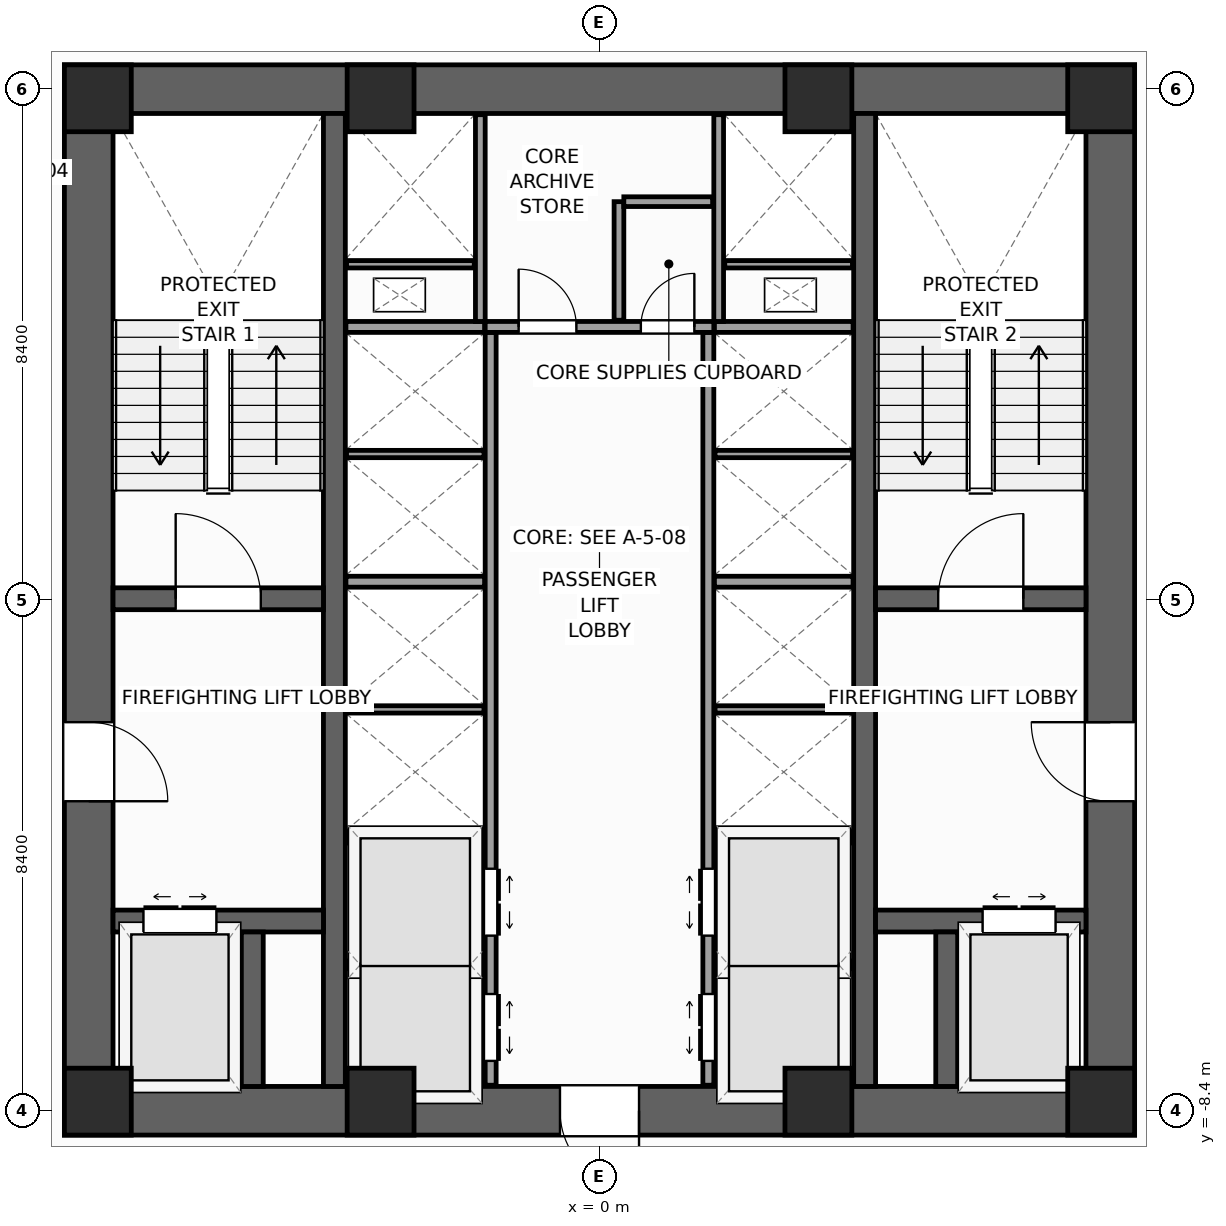
"""IFC4 building model, lengths in metres.
Left out: names, types, materials, properties, quantities, classifications, styles, units other than length and angle.
Written with IfcOpenShell. Run it as: python <this file> out.ifc"""

import sys

from ifc_helpers import new_model, si_unit, direction, frame, frame_2d, origin, origin_2d, place, context, subcontext, project, spatial, rectangle, extrude, source, transform, mapped, element, fill, save


model = new_model("IFC4")
c1 = context("Model", 3, precision=1e-05, world=origin(), true_north=direction((0.0, 1.0)))
c2 = subcontext(c1, "Body", "Model", "MODEL_VIEW")
j1 = project(units=[si_unit("LENGTHUNIT", "METRE"), si_unit("PLANEANGLEUNIT", "RADIAN")], contexts=[c1])
p1 = place(None, origin())
s1 = spatial("IfcSite", under=j1, at=p1, CompositionType="ELEMENT")
p2 = place(p1, origin())
s2 = spatial("IfcBuilding", under=s1, at=p2, CompositionType="ELEMENT")
p3 = place(p2, frame((0.0, 0.0, 42.0)))
s3 = spatial("IfcBuildingStorey", under=s2, at=p3, CompositionType="ELEMENT", Elevation=42.0)
p4 = place(p3, frame((-8.8, -8.4, 0.0), z_axis=(0.0, 0.0, 1.0), x_axis=(1.0, 0.0, 0.0)))
e1 = element("IfcWall", 1, at=p4, inside=s3, PredefinedType="SHEAR", context=c2, shape_type="SweptSolid", body=[
    extrude(rectangle(XDim=17.6, YDim=0.8, at=frame_2d((8.8, 0.0))), origin(), (0.0, 0.0, 1.0), 4.0),
])
p5 = place(p4, frame((8.15, 0.0, 0.0)))
e2 = element("IfcOpeningElement", 2, at=p5, cuts=e1, PredefinedType="OPENING", context=c2, shape_type="SweptSolid", body=[
    extrude(rectangle(XDim=1.3, YDim=2.2, at=frame_2d((0.65, 1.1))), frame((0.0, 0.41, 0.0), z_axis=(0.0, -1.0, 0.0), x_axis=(1.0, 0.0, 0.0)), (0.0, 0.0, 1.0), 0.82),
])
p6 = place(p3, frame((-8.8, 8.4, 0.0), z_axis=(0.0, 0.0, 1.0), x_axis=(1.0, 0.0, 0.0)))
e3 = element("IfcWall", 3, at=p6, inside=s3, PredefinedType="SHEAR", context=c2, shape_type="SweptSolid", body=[
    extrude(rectangle(XDim=17.6, YDim=0.8, at=frame_2d((8.8, 0.0))), origin(), (0.0, 0.0, 1.0), 4.0),
])
p7 = place(p3, frame((-8.4, -8.0, 0.0), z_axis=(0.0, 0.0, 1.0), x_axis=(0.0, 1.0, 0.0)))
e4 = element("IfcWall", 4, at=p7, inside=s3, PredefinedType="SHEAR", context=c2, shape_type="SweptSolid", body=[
    extrude(rectangle(XDim=16.0, YDim=0.8, at=frame_2d((8.0, 0.0))), origin(), (0.0, 0.0, 1.0), 4.0),
])
p8 = place(p7, frame((4.69, 0.0, 0.0)))
e5 = element("IfcOpeningElement", 5, at=p8, cuts=e4, PredefinedType="OPENING", context=c2, shape_type="SweptSolid", body=[
    extrude(rectangle(XDim=1.3, YDim=2.2, at=frame_2d((0.65, 1.1))), frame((0.0, 0.41, 0.0), z_axis=(0.0, -1.0, 0.0), x_axis=(1.0, 0.0, 0.0)), (0.0, 0.0, 1.0), 0.82),
])
p9 = place(p3, frame((8.4, -8.0, 0.0), z_axis=(0.0, 0.0, 1.0), x_axis=(0.0, 1.0, 0.0)))
e6 = element("IfcWall", 6, at=p9, inside=s3, PredefinedType="SHEAR", context=c2, shape_type="SweptSolid", body=[
    extrude(rectangle(XDim=16.0, YDim=0.8, at=frame_2d((8.0, 0.0))), origin(), (0.0, 0.0, 1.0), 4.0),
])
p10 = place(p9, frame((4.69, 0.0, 0.0)))
e7 = element("IfcOpeningElement", 7, at=p10, cuts=e6, PredefinedType="OPENING", context=c2, shape_type="SweptSolid", body=[
    extrude(rectangle(XDim=1.3, YDim=2.2, at=frame_2d((0.65, 1.1))), frame((0.0, 0.41, 0.0), z_axis=(0.0, -1.0, 0.0), x_axis=(1.0, 0.0, 0.0)), (0.0, 0.0, 1.0), 0.82),
])
for number, where, z_axis, x_axis in (
    (8, (-4.36, -8.0, 0.0), (0.0, 0.0, 1.0), (0.0, 1.0, 0.0)),
    (9, (4.36, -8.0, 0.0), (0.0, 0.0, 1.0), (0.0, 1.0, 0.0)),
):
    element("IfcWall", number, at=place(p3, frame(where, z_axis=z_axis, x_axis=x_axis)), inside=s3, PredefinedType="SHEAR", context=c2, shape_type="SweptSolid", body=[
        extrude(rectangle(XDim=16.0, YDim=0.36, at=frame_2d((8.0, 0.0))), origin(), (0.0, 0.0, 1.0), 4.0),
    ])
p11 = place(p3, frame((-8.0, 0.02, 0.0), z_axis=(0.0, 0.0, 1.0), x_axis=(1.0, 0.0, 0.0)))
e10 = element("IfcWall", 10, at=p11, inside=s3, PredefinedType="SHEAR", context=c2, shape_type="SweptSolid", body=[
    extrude(rectangle(XDim=3.46, YDim=0.36, at=frame_2d((1.73, 0.0))), origin(), (0.0, 0.0, 1.0), 4.0),
])
p12 = place(p11, frame((1.03, 0.0, 0.0)))
e11 = element("IfcOpeningElement", 11, at=p12, cuts=e10, PredefinedType="OPENING", context=c2, shape_type="SweptSolid", body=[
    extrude(rectangle(XDim=1.4, YDim=2.2, at=frame_2d((0.7, 1.1))), frame((0.0, 0.19, 0.0), z_axis=(0.0, -1.0, 0.0), x_axis=(1.0, 0.0, 0.0)), (0.0, 0.0, 1.0), 0.38),
])
p13 = place(p3, frame((4.54, 0.02, 0.0), z_axis=(0.0, 0.0, 1.0), x_axis=(1.0, 0.0, 0.0)))
e12 = element("IfcWall", 12, at=p13, inside=s3, PredefinedType="SHEAR", context=c2, shape_type="SweptSolid", body=[
    extrude(rectangle(XDim=3.46, YDim=0.36, at=frame_2d((1.73, 0.0))), origin(), (0.0, 0.0, 1.0), 4.0),
])
p14 = place(p13, frame((1.03, 0.0, 0.0)))
e13 = element("IfcOpeningElement", 13, at=p14, cuts=e12, PredefinedType="OPENING", context=c2, shape_type="SweptSolid", body=[
    extrude(rectangle(XDim=1.4, YDim=2.2, at=frame_2d((0.7, 1.1))), frame((0.0, 0.19, 0.0), z_axis=(0.0, -1.0, 0.0), x_axis=(1.0, 0.0, 0.0)), (0.0, 0.0, 1.0), 0.38),
])
p15 = place(p3, frame((-8.0, -5.28, 0.0), z_axis=(0.0, 0.0, 1.0), x_axis=(1.0, 0.0, 0.0)))
e14 = element("IfcWall", 14, at=p15, inside=s3, PredefinedType="SHEAR", context=c2, shape_type="SweptSolid", body=[
    extrude(rectangle(XDim=3.46, YDim=0.36, at=frame_2d((1.73, 0.0))), origin(), (0.0, 0.0, 1.0), 4.0),
])
p16 = place(p15, frame((0.5, 0.0, 0.0)))
e15 = element("IfcOpeningElement", 15, at=p16, cuts=e14, PredefinedType="OPENING", context=c2, shape_type="SweptSolid", body=[
    extrude(rectangle(XDim=1.2, YDim=2.25, at=frame_2d((0.6, 1.125))), frame((0.0, 0.19, 0.0), z_axis=(0.0, -1.0, 0.0), x_axis=(1.0, 0.0, 0.0)), (0.0, 0.0, 1.0), 0.38),
])
p17 = place(p3, frame((4.54, -5.28, 0.0), z_axis=(0.0, 0.0, 1.0), x_axis=(1.0, 0.0, 0.0)))
e16 = element("IfcWall", 16, at=p17, inside=s3, PredefinedType="SHEAR", context=c2, shape_type="SweptSolid", body=[
    extrude(rectangle(XDim=3.46, YDim=0.36, at=frame_2d((1.73, 0.0))), origin(), (0.0, 0.0, 1.0), 4.0),
])
p18 = place(p17, frame((1.76, 0.0, 0.0)))
e17 = element("IfcOpeningElement", 17, at=p18, cuts=e16, PredefinedType="OPENING", context=c2, shape_type="SweptSolid", body=[
    extrude(rectangle(XDim=1.2, YDim=2.25, at=frame_2d((0.6, 1.125))), frame((0.0, 0.19, 0.0), z_axis=(0.0, -1.0, 0.0), x_axis=(1.0, 0.0, 0.0)), (0.0, 0.0, 1.0), 0.38),
])
for number, where, z_axis, x_axis in (
    (18, (-5.71, -8.0, 0.0), (0.0, 0.0, 1.0), (0.0, 1.0, 0.0)),
    (19, (5.71, -8.0, 0.0), (0.0, 0.0, 1.0), (0.0, 1.0, 0.0)),
):
    element("IfcWall", number, at=place(p3, frame(where, z_axis=z_axis, x_axis=x_axis)), inside=s3, PredefinedType="SHEAR", context=c2, shape_type="SweptSolid", body=[
        extrude(rectangle(XDim=2.54, YDim=0.36, at=frame_2d((1.27, 0.0))), origin(), (0.0, 0.0, 1.0), 4.0),
    ])
m1 = source(origin(), c2, "Body", "SweptSolid", [
    extrude(rectangle(XDim=1.1, YDim=1.1, at=origin_2d()), origin(), (0.0, 0.0, 1.0), 4.0),
])
for number, where, z_axis, x_axis in (
    (20, (-8.25, -8.25, 0.0), (0.0, 0.0, 1.0), (1.0, 0.0, 0.0)),
    (21, (8.25, -8.25, 0.0), (0.0, 0.0, 1.0), (1.0, 0.0, 0.0)),
    (22, (8.25, 8.25, 0.0), (0.0, 0.0, 1.0), (1.0, 0.0, 0.0)),
    (23, (-8.25, 8.25, 0.0), (0.0, 0.0, 1.0), (1.0, 0.0, 0.0)),
    (24, (-3.6, -8.25, 0.0), (0.0, 0.0, 1.0), (1.0, 0.0, 0.0)),
    (25, (3.6, -8.25, 0.0), (0.0, 0.0, 1.0), (1.0, 0.0, 0.0)),
    (26, (-3.6, 8.25, 0.0), (0.0, 0.0, 1.0), (1.0, 0.0, 0.0)),
    (27, (3.6, 8.25, 0.0), (0.0, 0.0, 1.0), (1.0, 0.0, 0.0)),
):
    element("IfcColumn", number, at=place(p3, frame(where, z_axis=z_axis, x_axis=x_axis)), inside=s3, PredefinedType="PILASTER", context=c2, shape_type="MappedRepresentation", body=[
        mapped(m1, transform((0.0, 0.0, 0.0), scale=1.0)),
    ])
p19 = place(p3, frame((-1.79, -7.98, 0.0), z_axis=(0.0, 0.0, 1.0), x_axis=(0.0, 1.0, 0.0)))
e28 = element("IfcWall", 28, at=p19, inside=s3, PredefinedType="PARTITIONING", context=c2, shape_type="SweptSolid", body=[
    extrude(rectangle(XDim=12.38, YDim=0.18, at=frame_2d((6.19, 0.0))), origin(), (0.0, 0.0, 1.0), 3.72),
])
p20 = place(p19, frame((0.4, 0.0, 0.0)))
e29 = element("IfcOpeningElement", 29, at=p20, cuts=e28, PredefinedType="OPENING", context=c2, shape_type="SweptSolid", body=[
    extrude(rectangle(XDim=1.1, YDim=2.2, at=frame_2d((0.55, 1.1))), frame((0.0, 0.1, 0.0), z_axis=(0.0, -1.0, 0.0), x_axis=(1.0, 0.0, 0.0)), (0.0, 0.0, 1.0), 0.2),
])
p21 = place(p19, frame((2.46, 0.0, 0.0)))
e30 = element("IfcOpeningElement", 30, at=p21, cuts=e28, PredefinedType="OPENING", context=c2, shape_type="SweptSolid", body=[
    extrude(rectangle(XDim=1.1, YDim=2.2, at=frame_2d((0.55, 1.1))), frame((0.0, 0.1, 0.0), z_axis=(0.0, -1.0, 0.0), x_axis=(1.0, 0.0, 0.0)), (0.0, 0.0, 1.0), 0.2),
])
p22 = place(p3, frame((1.79, -7.98, 0.0), z_axis=(0.0, 0.0, 1.0), x_axis=(0.0, 1.0, 0.0)))
e31 = element("IfcWall", 31, at=p22, inside=s3, PredefinedType="PARTITIONING", context=c2, shape_type="SweptSolid", body=[
    extrude(rectangle(XDim=12.38, YDim=0.18, at=frame_2d((6.19, 0.0))), origin(), (0.0, 0.0, 1.0), 3.72),
])
p23 = place(p22, frame((0.4, 0.0, 0.0)))
e32 = element("IfcOpeningElement", 32, at=p23, cuts=e31, PredefinedType="OPENING", context=c2, shape_type="SweptSolid", body=[
    extrude(rectangle(XDim=1.1, YDim=2.2, at=frame_2d((0.55, 1.1))), frame((0.0, 0.1, 0.0), z_axis=(0.0, -1.0, 0.0), x_axis=(1.0, 0.0, 0.0)), (0.0, 0.0, 1.0), 0.2),
])
p24 = place(p22, frame((2.46, 0.0, 0.0)))
e33 = element("IfcOpeningElement", 33, at=p24, cuts=e31, PredefinedType="OPENING", context=c2, shape_type="SweptSolid", body=[
    extrude(rectangle(XDim=1.1, YDim=2.2, at=frame_2d((0.55, 1.1))), frame((0.0, 0.1, 0.0), z_axis=(0.0, -1.0, 0.0), x_axis=(1.0, 0.0, 0.0)), (0.0, 0.0, 1.0), 0.2),
])
p25 = place(p3, frame((-1.88, 4.49, 0.0), z_axis=(0.0, 0.0, 1.0), x_axis=(1.0, 0.0, 0.0)))
e34 = element("IfcWall", 34, at=p25, inside=s3, PredefinedType="PARTITIONING", context=c2, shape_type="SweptSolid", body=[
    extrude(rectangle(XDim=3.76, YDim=0.18, at=frame_2d((1.88, 0.0))), origin(), (0.0, 0.0, 1.0), 3.72),
])
p26 = place(p25, frame((0.55, 0.0, 0.0)))
e35 = element("IfcOpeningElement", 35, at=p26, cuts=e34, PredefinedType="OPENING", context=c2, shape_type="SweptSolid", body=[
    extrude(rectangle(XDim=0.95, YDim=2.1, at=frame_2d((0.475, 1.05))), frame((0.0, 0.1, 0.0), z_axis=(0.0, -1.0, 0.0), x_axis=(1.0, 0.0, 0.0)), (0.0, 0.0, 1.0), 0.2),
])
p27 = place(p25, frame((2.56, 0.0, 0.0)))
e36 = element("IfcOpeningElement", 36, at=p27, cuts=e34, PredefinedType="OPENING", context=c2, shape_type="SweptSolid", body=[
    extrude(rectangle(XDim=0.88, YDim=2.1, at=frame_2d((0.44, 1.05))), frame((0.0, 0.1, 0.0), z_axis=(0.0, -1.0, 0.0), x_axis=(1.0, 0.0, 0.0)), (0.0, 0.0, 1.0), 0.2),
])
for number, where, z_axis, x_axis in (
    (37, (-4.17, -3.9, 0.0), (0.0, 0.0, 1.0), (1.0, 0.0, 0.0)),
    (38, (1.89, -3.9, 0.0), (0.0, 0.0, 1.0), (1.0, 0.0, 0.0)),
    (39, (-4.17, 0.3, 0.0), (0.0, 0.0, 1.0), (1.0, 0.0, 0.0)),
    (40, (1.89, 0.3, 0.0), (0.0, 0.0, 1.0), (1.0, 0.0, 0.0)),
    (41, (-4.17, 4.49, 0.0), (0.0, 0.0, 1.0), (1.0, 0.0, 0.0)),
    (42, (1.89, 4.49, 0.0), (0.0, 0.0, 1.0), (1.0, 0.0, 0.0)),
):
    element("IfcWall", number, at=place(p3, frame(where, z_axis=z_axis, x_axis=x_axis)), inside=s3, PredefinedType="PARTITIONING", context=c2, shape_type="SweptSolid", body=[
        extrude(rectangle(XDim=2.28, YDim=0.18, at=frame_2d((1.14, 0.0))), origin(), (0.0, 0.0, 1.0), 3.72),
    ])
for number, where, z_axis, x_axis in (
    (43, (-4.16, -6.0, 0.0), (0.0, 0.0, 1.0), (1.0, 0.0, 0.0)),
    (44, (1.9, -6.0, 0.0), (0.0, 0.0, 1.0), (1.0, 0.0, 0.0)),
    (45, (-4.16, -1.8, 0.0), (0.0, 0.0, 1.0), (1.0, 0.0, 0.0)),
    (46, (1.9, -1.8, 0.0), (0.0, 0.0, 1.0), (1.0, 0.0, 0.0)),
    (47, (-4.16, 2.4, 0.0), (0.0, 0.0, 1.0), (1.0, 0.0, 0.0)),
    (48, (1.9, 2.4, 0.0), (0.0, 0.0, 1.0), (1.0, 0.0, 0.0)),
):
    element("IfcWall", number, at=place(p3, frame(where, z_axis=z_axis, x_axis=x_axis)), inside=s3, PredefinedType="PARTITIONING", context=c2, shape_type="SweptSolid", body=[
        extrude(rectangle(XDim=2.26, YDim=0.12, at=frame_2d((1.13, 0.0))), origin(), (0.0, 0.0, 1.0), 3.72),
    ])
for number, where, z_axis, x_axis in (
    (49, (-1.96, 4.58, 0.0), (0.0, 0.0, 1.0), (0.0, 1.0, 0.0)),
    (50, (1.96, 4.58, 0.0), (0.0, 0.0, 1.0), (0.0, 1.0, 0.0)),
):
    element("IfcWall", number, at=place(p3, frame(where, z_axis=z_axis, x_axis=x_axis)), inside=s3, PredefinedType="PARTITIONING", context=c2, shape_type="SweptSolid", body=[
        extrude(rectangle(XDim=3.4, YDim=0.16, at=frame_2d((1.7, 0.0))), origin(), (0.0, 0.0, 1.0), 3.72),
    ])
for number, where, z_axis, x_axis in (
    (51, (-4.16, 5.52, 0.0), (0.0, 0.0, 1.0), (1.0, 0.0, 0.0)),
    (52, (2.06, 5.52, 0.0), (0.0, 0.0, 1.0), (1.0, 0.0, 0.0)),
):
    element("IfcWall", number, at=place(p3, frame(where, z_axis=z_axis, x_axis=x_axis)), inside=s3, PredefinedType="PARTITIONING", context=c2, shape_type="SweptSolid", body=[
        extrude(rectangle(XDim=2.1, YDim=0.12, at=frame_2d((1.05, 0.0))), origin(), (0.0, 0.0, 1.0), 3.72),
    ])
p28 = place(p3, frame((0.32, 4.6, 0.0), z_axis=(0.0, 0.0, 1.0), x_axis=(0.0, 1.0, 0.0)))
e53 = element("IfcWall", 53, at=p28, inside=s3, PredefinedType="PARTITIONING", context=c2, shape_type="SweptSolid", body=[
    extrude(rectangle(XDim=1.95, YDim=0.16, at=frame_2d((0.975, 0.0))), origin(), (0.0, 0.0, 1.0), 3.72),
])
p29 = place(p3, frame((0.4, 6.55, 0.0), z_axis=(0.0, 0.0, 1.0), x_axis=(1.0, 0.0, 0.0)))
e54 = element("IfcWall", 54, at=p29, inside=s3, PredefinedType="PARTITIONING", context=c2, shape_type="SweptSolid", body=[
    extrude(rectangle(XDim=1.46, YDim=0.16, at=frame_2d((0.73, 0.0))), origin(), (0.0, 0.0, 1.0), 3.72),
])
m2 = source(origin(), c2, "Body", "SweptSolid", [
    extrude(rectangle(XDim=1.4, YDim=2.2, at=frame_2d((0.7, 1.1))), frame((0.0, 0.025, 0.0), z_axis=(0.0, -1.0, 0.0), x_axis=(1.0, 0.0, 0.0)), (0.0, 0.0, 1.0), 0.05),
])
p30 = place(p12, origin())
e55 = element("IfcDoor", 55, at=p30, inside=s3, OperationType="SINGLE_SWING_LEFT", PredefinedType="DOOR", context=c2, shape_type="MappedRepresentation", body=[
    mapped(m2, transform((0.0, 0.0, 0.0), scale=1.0)),
])
fill(e11, e55)
p31 = place(p14, origin())
e56 = element("IfcDoor", 56, at=p31, inside=s3, OperationType="SINGLE_SWING_RIGHT", PredefinedType="DOOR", context=c2, shape_type="MappedRepresentation", body=[
    mapped(m2, transform((0.0, 0.0, 0.0), scale=1.0)),
])
fill(e13, e56)
m3 = source(origin(), c2, "Body", "SweptSolid", [
    extrude(rectangle(XDim=1.3, YDim=2.2, at=frame_2d((0.65, 1.1))), frame((0.0, 0.025, 0.0), z_axis=(0.0, -1.0, 0.0), x_axis=(1.0, 0.0, 0.0)), (0.0, 0.0, 1.0), 0.05),
])
p32 = place(p8, frame((1.3, 0.0, 0.0), z_axis=(0.0, 0.0, 1.0), x_axis=(-1.0, 0.0, 0.0)))
e57 = element("IfcDoor", 57, at=p32, inside=s3, OperationType="SINGLE_SWING_LEFT", PredefinedType="DOOR", context=c2, shape_type="MappedRepresentation", body=[
    mapped(m3, transform((0.0, 0.0, 0.0), scale=1.0)),
])
fill(e5, e57)
p33 = place(p10, origin())
e58 = element("IfcDoor", 58, at=p33, inside=s3, OperationType="SINGLE_SWING_RIGHT", PredefinedType="DOOR", context=c2, shape_type="MappedRepresentation", body=[
    mapped(m3, transform((0.0, 0.0, 0.0), scale=1.0)),
])
fill(e7, e58)
p34 = place(p5, frame((1.3, 0.0, 0.0), z_axis=(0.0, 0.0, 1.0), x_axis=(-1.0, 0.0, 0.0)))
e59 = element("IfcDoor", 59, at=p34, inside=s3, OperationType="SINGLE_SWING_RIGHT", PredefinedType="DOOR", context=c2, shape_type="MappedRepresentation", body=[
    mapped(m3, transform((0.0, 0.0, 0.0), scale=1.0)),
])
fill(e2, e59)
m4 = source(origin(), c2, "Body", "SweptSolid", [
    extrude(rectangle(XDim=1.2, YDim=2.25, at=frame_2d((0.6, 1.125))), frame((0.0, 0.025, 0.0), z_axis=(0.0, -1.0, 0.0), x_axis=(1.0, 0.0, 0.0)), (0.0, 0.0, 1.0), 0.05),
])
p35 = place(p16, origin())
e60 = element("IfcDoor", 60, at=p35, inside=s3, OperationType="DOUBLE_DOOR_SLIDING", PredefinedType="DOOR", context=c2, shape_type="MappedRepresentation", body=[
    mapped(m4, transform((0.0, 0.0, 0.0), scale=1.0)),
])
fill(e15, e60)
p36 = place(p18, origin())
e61 = element("IfcDoor", 61, at=p36, inside=s3, OperationType="DOUBLE_DOOR_SLIDING", PredefinedType="DOOR", context=c2, shape_type="MappedRepresentation", body=[
    mapped(m4, transform((0.0, 0.0, 0.0), scale=1.0)),
])
fill(e17, e61)
m5 = source(origin(), c2, "Body", "SweptSolid", [
    extrude(rectangle(XDim=1.1, YDim=2.2, at=frame_2d((0.55, 1.1))), frame((0.0, 0.025, 0.0), z_axis=(0.0, -1.0, 0.0), x_axis=(1.0, 0.0, 0.0)), (0.0, 0.0, 1.0), 0.05),
])
p37 = place(p20, frame((1.1, 0.0, 0.0), z_axis=(0.0, 0.0, 1.0), x_axis=(-1.0, 0.0, 0.0)))
e62 = element("IfcDoor", 62, at=p37, inside=s3, OperationType="DOUBLE_DOOR_SLIDING", PredefinedType="DOOR", context=c2, shape_type="MappedRepresentation", body=[
    mapped(m5, transform((0.0, 0.0, 0.0), scale=1.0)),
])
fill(e29, e62)
p38 = place(p21, frame((1.1, 0.0, 0.0), z_axis=(0.0, 0.0, 1.0), x_axis=(-1.0, 0.0, 0.0)))
e63 = element("IfcDoor", 63, at=p38, inside=s3, OperationType="DOUBLE_DOOR_SLIDING", PredefinedType="DOOR", context=c2, shape_type="MappedRepresentation", body=[
    mapped(m5, transform((0.0, 0.0, 0.0), scale=1.0)),
])
fill(e30, e63)
p39 = place(p23, origin())
e64 = element("IfcDoor", 64, at=p39, inside=s3, OperationType="DOUBLE_DOOR_SLIDING", PredefinedType="DOOR", context=c2, shape_type="MappedRepresentation", body=[
    mapped(m5, transform((0.0, 0.0, 0.0), scale=1.0)),
])
fill(e32, e64)
p40 = place(p24, origin())
e65 = element("IfcDoor", 65, at=p40, inside=s3, OperationType="DOUBLE_DOOR_SLIDING", PredefinedType="DOOR", context=c2, shape_type="MappedRepresentation", body=[
    mapped(m5, transform((0.0, 0.0, 0.0), scale=1.0)),
])
fill(e33, e65)
m6 = source(origin(), c2, "Body", "SweptSolid", [
    extrude(rectangle(XDim=0.95, YDim=2.1, at=frame_2d((0.475, 1.05))), frame((0.0, 0.025, 0.0), z_axis=(0.0, -1.0, 0.0), x_axis=(1.0, 0.0, 0.0)), (0.0, 0.0, 1.0), 0.05),
])
p41 = place(p26, origin())
e66 = element("IfcDoor", 66, at=p41, inside=s3, OperationType="SINGLE_SWING_LEFT", PredefinedType="DOOR", context=c2, shape_type="MappedRepresentation", body=[
    mapped(m6, transform((0.0, 0.0, 0.0), scale=1.0)),
])
fill(e35, e66)
m7 = source(origin(), c2, "Body", "SweptSolid", [
    extrude(rectangle(XDim=0.88, YDim=2.1, at=frame_2d((0.44, 1.05))), frame((0.0, 0.025, 0.0), z_axis=(0.0, -1.0, 0.0), x_axis=(1.0, 0.0, 0.0)), (0.0, 0.0, 1.0), 0.05),
])
p42 = place(p27, origin())
e67 = element("IfcDoor", 67, at=p42, inside=s3, OperationType="SINGLE_SWING_RIGHT", PredefinedType="DOOR", context=c2, shape_type="MappedRepresentation", body=[
    mapped(m7, transform((0.0, 0.0, 0.0), scale=1.0)),
])
fill(e36, e67)
save(model, sys.argv[1])
